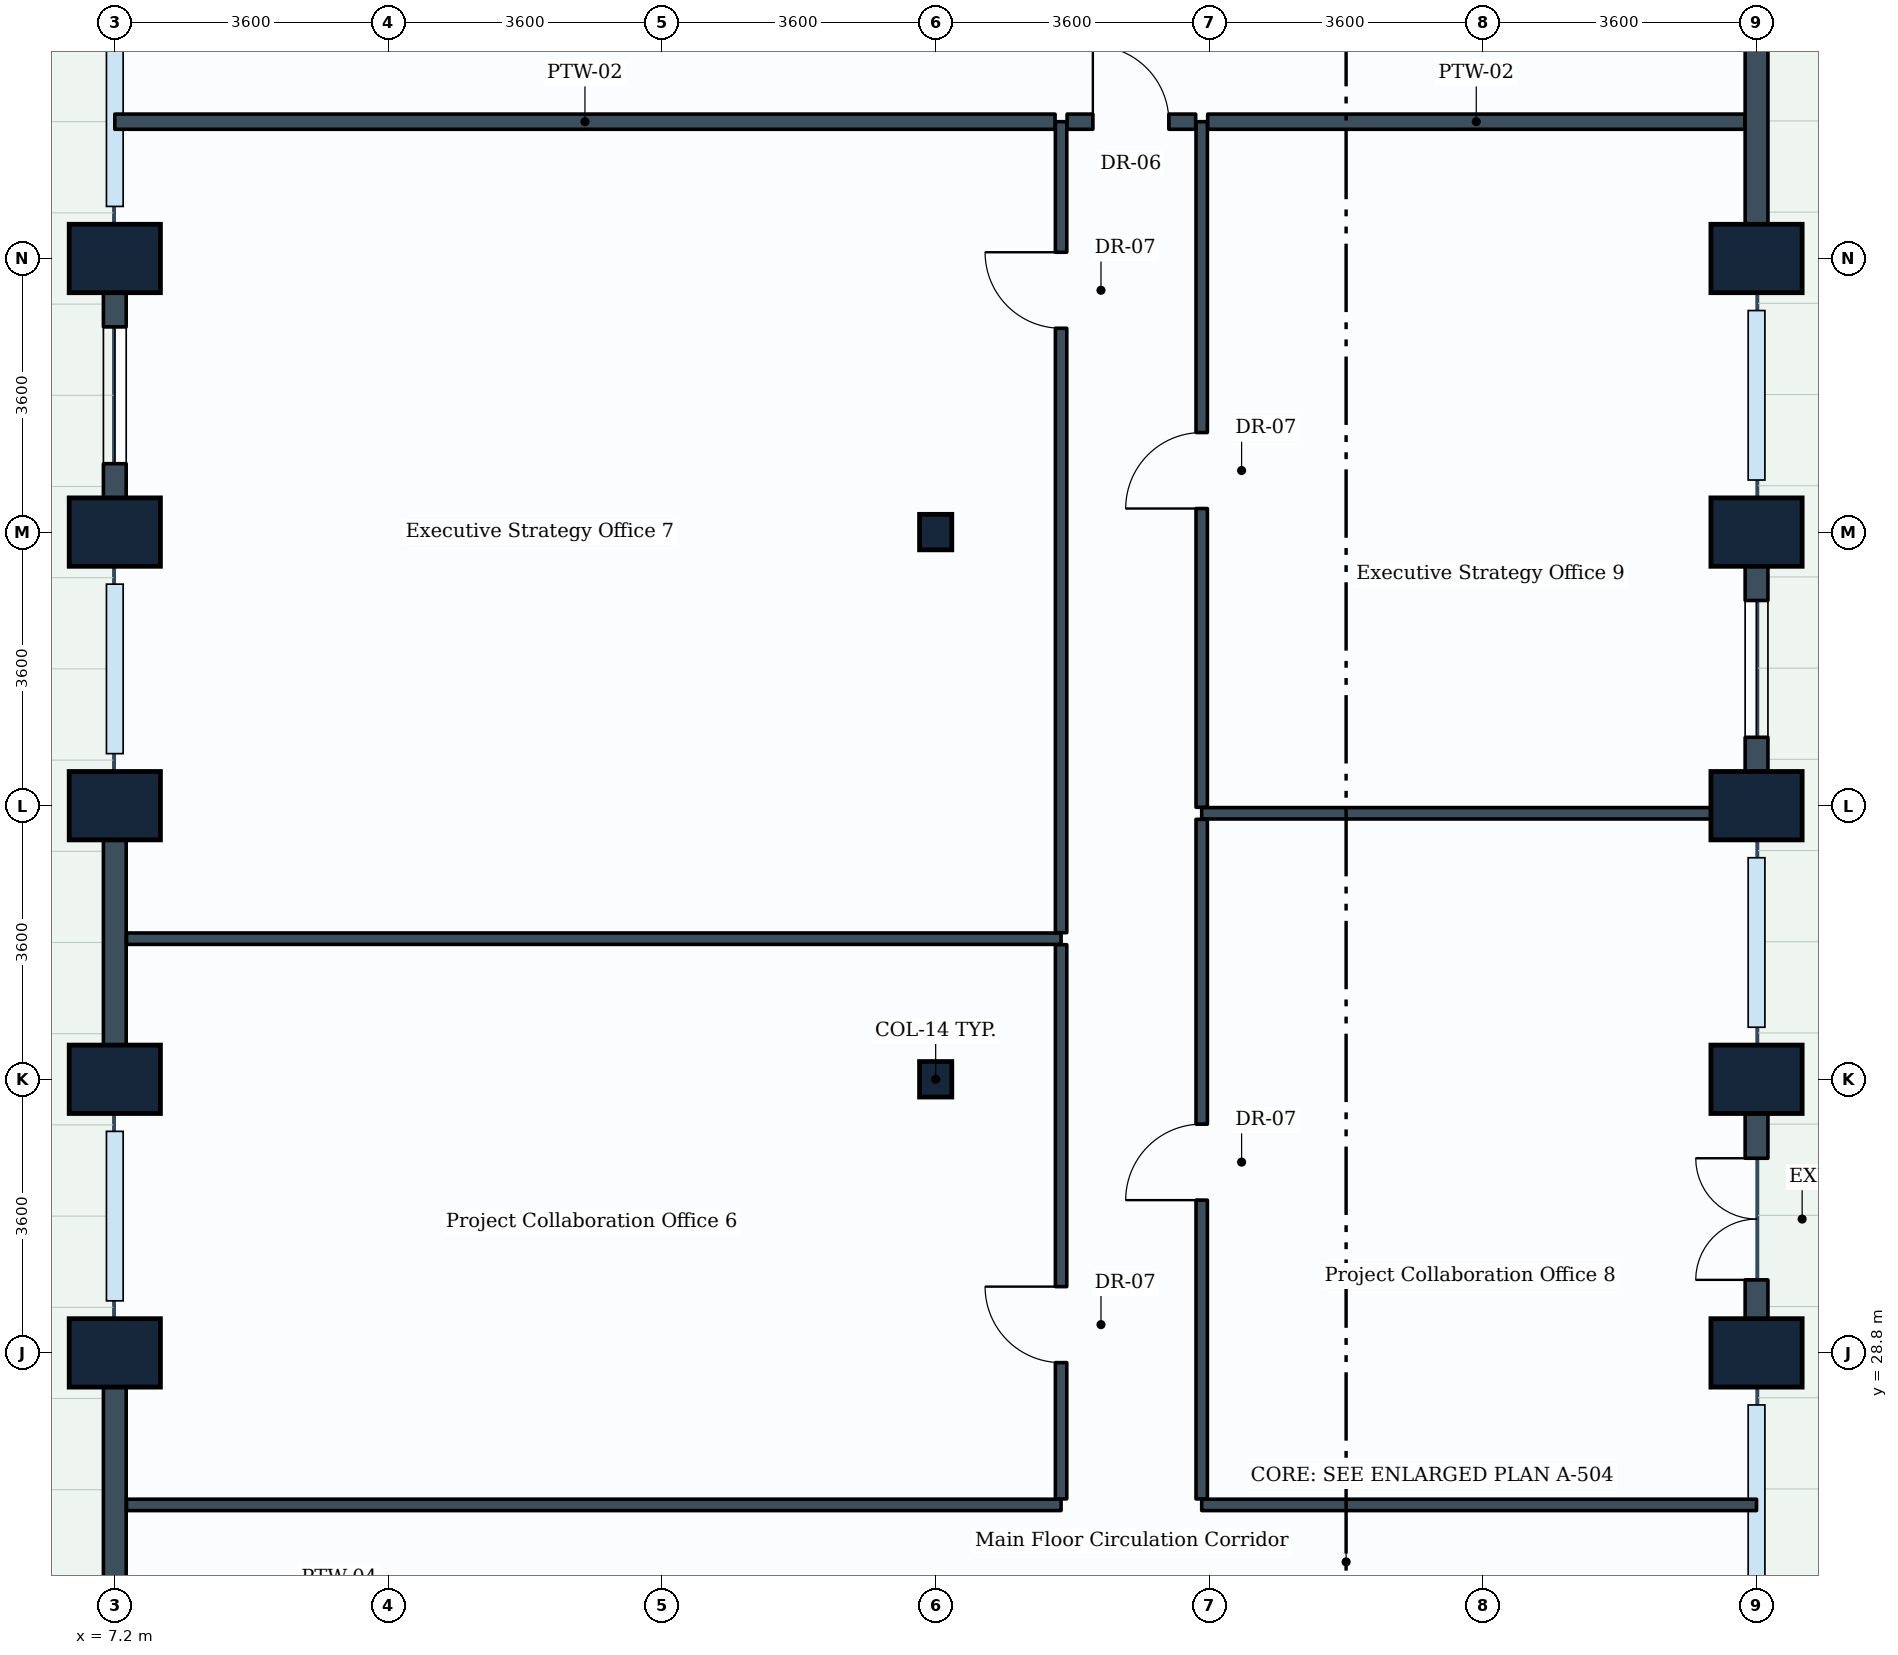
"""IFC4 building model, lengths in metres.
Left out: names, types, materials, properties, quantities, classifications, styles, units other than length and angle.
Written with IfcOpenShell. Run it as: python <this file> out.ifc"""

import sys

from ifc_helpers import new_model, si_unit, direction, frame, frame_2d, origin, origin_2d, place, context, subcontext, project, spatial, rectangle, i_section, extrude, element, fill, save


model = new_model("IFC4")
c1 = context("Model", 3, precision=1e-05, world=origin(), true_north=direction((0.0, 1.0)))
c2 = subcontext(c1, "Body", "Model", "MODEL_VIEW")
j1 = project(units=[si_unit("LENGTHUNIT", "METRE"), si_unit("PLANEANGLEUNIT", "RADIAN")], contexts=[c1])
p1 = place(None, origin())
s1 = spatial("IfcSite", under=j1, at=p1, CompositionType="ELEMENT")
p2 = place(p1, origin())
s2 = spatial("IfcBuilding", under=s1, at=p2, CompositionType="ELEMENT")
p3 = place(p2, frame((0.0, 0.0, 24.0)))
s3 = spatial("IfcBuildingStorey", under=s2, at=p3, CompositionType="ELEMENT", Elevation=24.0)
for number, where, z_axis, x_axis in (
    (1, (7.2, 28.8, 0.0), (0.0, 0.0, 1.0), (0.0, 1.0, 0.0)),
    (2, (7.2, 32.4, 0.0), (0.0, 0.0, 1.0), (0.0, 1.0, 0.0)),
    (3, (7.2, 36.0, 0.0), (0.0, 0.0, 1.0), (0.0, 1.0, 0.0)),
    (4, (7.2, 39.6, 0.0), (0.0, 0.0, 1.0), (0.0, 1.0, 0.0)),
    (5, (7.2, 43.2, 0.0), (0.0, 0.0, 1.0), (0.0, 1.0, 0.0)),
):
    element("IfcColumn", number, at=place(p3, frame(where, z_axis=z_axis, x_axis=x_axis)), inside=s3, PredefinedType="COLUMN", context=c2, shape_type="SweptSolid", body=[
        extrude(rectangle(XDim=0.9, YDim=1.2, at=origin_2d()), origin(), (0.0, 0.0, 1.0), 3.9),
    ])
for number, where, z_axis, x_axis in (
    (6, (18.0, 32.4, 0.0), (0.0, 0.0, 1.0), (1.0, 0.0, 0.0)),
    (7, (18.0, 39.6, 0.0), (0.0, 0.0, 1.0), (1.0, 0.0, 0.0)),
):
    element("IfcColumn", number, at=place(p3, frame(where, z_axis=z_axis, x_axis=x_axis)), inside=s3, PredefinedType="COLUMN", context=c2, shape_type="SweptSolid", body=[
        extrude(i_section(OverallWidth=0.424, OverallDepth=0.467, WebThickness=0.033, FlangeThickness=0.053, FilletRadius=0.015, at=origin_2d()), origin(), (0.0, 0.0, 1.0), 3.9),
    ])
for number, where, z_axis, x_axis in (
    (8, (28.8, 28.8, 0.0), (0.0, 0.0, 1.0), (0.0, 1.0, 0.0)),
    (9, (28.8, 32.4, 0.0), (0.0, 0.0, 1.0), (0.0, 1.0, 0.0)),
    (10, (28.8, 36.0, 0.0), (0.0, 0.0, 1.0), (0.0, 1.0, 0.0)),
    (11, (28.8, 39.6, 0.0), (0.0, 0.0, 1.0), (0.0, 1.0, 0.0)),
    (12, (28.8, 43.2, 0.0), (0.0, 0.0, 1.0), (0.0, 1.0, 0.0)),
):
    element("IfcColumn", number, at=place(p3, frame(where, z_axis=z_axis, x_axis=x_axis)), inside=s3, PredefinedType="COLUMN", context=c2, shape_type="SweptSolid", body=[
        extrude(rectangle(XDim=0.9, YDim=1.2, at=origin_2d()), origin(), (0.0, 0.0, 1.0), 3.9),
    ])
p4 = place(p3, frame((28.8, 28.8, 0.0), z_axis=(0.0, 0.0, 1.0), x_axis=(0.0, 1.0, 0.0)))
e13 = element("IfcWall", 13, at=p4, inside=s3, PredefinedType="STANDARD", context=c2, shape_type="SweptSolid", body=[
    extrude(rectangle(XDim=3.6, YDim=0.3, at=frame_2d((1.8, 0.0))), origin(), (0.0, 0.0, 1.0), 2.93),
])
p5 = place(p4, frame((0.961, 0.0, 0.0)))
e14 = element("IfcOpeningElement", 14, at=p5, cuts=e13, PredefinedType="OPENING", context=c2, shape_type="SweptSolid", body=[
    extrude(rectangle(XDim=1.6, YDim=2.1, at=frame_2d((0.8, 1.05))), frame((0.0, 0.16, 0.0), z_axis=(0.0, -1.0, 0.0), x_axis=(1.0, 0.0, 0.0)), (0.0, 0.0, 1.0), 0.32),
])
p6 = place(p3, frame((28.8, 36.0, 0.0), z_axis=(0.0, 0.0, 1.0), x_axis=(0.0, 1.0, 0.0)))
e15 = element("IfcWall", 15, at=p6, inside=s3, PredefinedType="STANDARD", context=c2, shape_type="SweptSolid", body=[
    extrude(rectangle(XDim=3.6, YDim=0.3, at=frame_2d((1.8, 0.0))), origin(), (0.0, 0.0, 1.0), 2.93),
])
p7 = place(p6, frame((0.9, 0.0, 0.85)))
e16 = element("IfcOpeningElement", 16, at=p7, cuts=e15, PredefinedType="OPENING", context=c2, shape_type="SweptSolid", body=[
    extrude(rectangle(XDim=1.8, YDim=1.35, at=frame_2d((0.9, 0.675))), frame((0.0, 0.16, 0.0), z_axis=(0.0, -1.0, 0.0), x_axis=(1.0, 0.0, 0.0)), (0.0, 0.0, 1.0), 0.32),
])
p8 = place(p3, frame((28.8, 43.2, 0.0), z_axis=(0.0, 0.0, 1.0), x_axis=(0.0, 1.0, 0.0)))
e17 = element("IfcWall", 17, at=p8, inside=s3, PredefinedType="STANDARD", context=c2, shape_type="SweptSolid", body=[
    extrude(rectangle(XDim=3.6, YDim=0.3, at=frame_2d((1.8, 0.0))), origin(), (0.0, 0.0, 1.0), 2.93),
])
p9 = place(p3, frame((7.2, 39.6, 0.0), z_axis=(0.0, 0.0, 1.0), x_axis=(0.0, 1.0, 0.0)))
e18 = element("IfcWall", 18, at=p9, inside=s3, PredefinedType="STANDARD", context=c2, shape_type="SweptSolid", body=[
    extrude(rectangle(XDim=3.6, YDim=0.3, at=frame_2d((1.8, 0.0))), origin(), (0.0, 0.0, 1.0), 2.93),
])
p10 = place(p9, frame((0.9, 0.0, 0.85)))
e19 = element("IfcOpeningElement", 19, at=p10, cuts=e18, PredefinedType="OPENING", context=c2, shape_type="SweptSolid", body=[
    extrude(rectangle(XDim=1.8, YDim=1.35, at=frame_2d((0.9, 0.675))), frame((0.0, 0.16, 0.0), z_axis=(0.0, -1.0, 0.0), x_axis=(1.0, 0.0, 0.0)), (0.0, 0.0, 1.0), 0.32),
])
for number, where, z_axis, x_axis in (
    (20, (7.2, 32.4, 0.0), (0.0, 0.0, 1.0), (0.0, 1.0, 0.0)),
    (21, (7.2, 25.2, 0.0), (0.0, 0.0, 1.0), (0.0, 1.0, 0.0)),
):
    element("IfcWall", number, at=place(p3, frame(where, z_axis=z_axis, x_axis=x_axis)), inside=s3, PredefinedType="STANDARD", context=c2, shape_type="SweptSolid", body=[
        extrude(rectangle(XDim=3.6, YDim=0.3, at=frame_2d((1.8, 0.0))), origin(), (0.0, 0.0, 1.0), 2.93),
    ])
for number, where, z_axis, x_axis in (
    (22, (7.354, 26.8, 0.0), (0.0, 0.0, 1.0), (1.0, 0.0, 0.0)),
    (23, (7.354, 34.25, 0.0), (0.0, 0.0, 1.0), (1.0, 0.0, 0.0)),
):
    element("IfcWall", number, at=place(p3, frame(where, z_axis=z_axis, x_axis=x_axis)), inside=s3, PredefinedType="PARTITIONING", context=c2, shape_type="SweptSolid", body=[
        extrude(rectangle(XDim=12.296, YDim=0.15, at=frame_2d((6.148, 0.0))), origin(), (0.0, 0.0, 1.0), 2.93),
    ])
p11 = place(p3, frame((19.65, 26.879, 0.0), z_axis=(0.0, 0.0, 1.0), x_axis=(0.0, 1.0, 0.0)))
e24 = element("IfcWall", 24, at=p11, inside=s3, PredefinedType="PARTITIONING", context=c2, shape_type="SweptSolid", body=[
    extrude(rectangle(XDim=7.292, YDim=0.15, at=frame_2d((3.646, 0.0))), origin(), (0.0, 0.0, 1.0), 3.08),
])
p12 = place(p11, frame((1.793, 0.0, 0.0)))
e25 = element("IfcOpeningElement", 25, at=p12, cuts=e24, PredefinedType="OPENING", context=c2, shape_type="SweptSolid", body=[
    extrude(rectangle(XDim=1.0, YDim=2.1, at=frame_2d((0.5, 1.05))), frame((0.0, 0.085, 0.0), z_axis=(0.0, -1.0, 0.0), x_axis=(1.0, 0.0, 0.0)), (0.0, 0.0, 1.0), 0.17),
])
p13 = place(p3, frame((19.65, 34.329, 0.0), z_axis=(0.0, 0.0, 1.0), x_axis=(0.0, 1.0, 0.0)))
e26 = element("IfcWall", 26, at=p13, inside=s3, PredefinedType="PARTITIONING", context=c2, shape_type="SweptSolid", body=[
    extrude(rectangle(XDim=10.671, YDim=0.15, at=frame_2d((5.335, 0.0))), origin(), (0.0, 0.0, 1.0), 3.08),
])
p14 = place(p13, frame((7.953, 0.0, 0.0)))
e27 = element("IfcOpeningElement", 27, at=p14, cuts=e26, PredefinedType="OPENING", context=c2, shape_type="SweptSolid", body=[
    extrude(rectangle(XDim=1.0, YDim=2.1, at=frame_2d((0.5, 1.05))), frame((0.0, 0.085, 0.0), z_axis=(0.0, -1.0, 0.0), x_axis=(1.0, 0.0, 0.0)), (0.0, 0.0, 1.0), 0.17),
])
p15 = place(p3, frame((21.5, 26.8, 0.0), z_axis=(0.0, 0.0, 1.0), x_axis=(1.0, 0.0, 0.0)))
e28 = element("IfcWall", 28, at=p15, inside=s3, PredefinedType="PARTITIONING", context=c2, shape_type="SweptSolid", body=[
    extrude(rectangle(XDim=7.3, YDim=0.15, at=frame_2d((3.65, 0.0))), origin(), (0.0, 0.0, 1.0), 3.635),
])
p16 = place(p3, frame((21.5, 35.9, 0.0), z_axis=(0.0, 0.0, 1.0), x_axis=(1.0, 0.0, 0.0)))
e29 = element("IfcWall", 29, at=p16, inside=s3, PredefinedType="PARTITIONING", context=c2, shape_type="SweptSolid", body=[
    extrude(rectangle(XDim=7.246, YDim=0.15, at=frame_2d((3.623, 0.0))), origin(), (0.0, 0.0, 1.0), 2.93),
])
p17 = place(p3, frame((21.5, 26.879, 0.0), z_axis=(0.0, 0.0, 1.0), x_axis=(0.0, 1.0, 0.0)))
e30 = element("IfcWall", 30, at=p17, inside=s3, PredefinedType="PARTITIONING", context=c2, shape_type="SweptSolid", body=[
    extrude(rectangle(XDim=8.942, YDim=0.15, at=frame_2d((4.471, 0.0))), origin(), (0.0, 0.0, 1.0), 3.08),
])
p18 = place(p17, frame((3.931, 0.0, 0.0)))
e31 = element("IfcOpeningElement", 31, at=p18, cuts=e30, PredefinedType="OPENING", context=c2, shape_type="SweptSolid", body=[
    extrude(rectangle(XDim=1.0, YDim=2.1, at=frame_2d((0.5, 1.05))), frame((0.0, 0.085, 0.0), z_axis=(0.0, -1.0, 0.0), x_axis=(1.0, 0.0, 0.0)), (0.0, 0.0, 1.0), 0.17),
])
p19 = place(p3, frame((21.5, 35.979, 0.0), z_axis=(0.0, 0.0, 1.0), x_axis=(0.0, 1.0, 0.0)))
e32 = element("IfcWall", 32, at=p19, inside=s3, PredefinedType="PARTITIONING", context=c2, shape_type="SweptSolid", body=[
    extrude(rectangle(XDim=9.021, YDim=0.15, at=frame_2d((4.51, 0.0))), origin(), (0.0, 0.0, 1.0), 3.03),
])
p20 = place(p19, frame((3.931, 0.0, 0.0)))
e33 = element("IfcOpeningElement", 33, at=p20, cuts=e32, PredefinedType="OPENING", context=c2, shape_type="SweptSolid", body=[
    extrude(rectangle(XDim=1.0, YDim=2.1, at=frame_2d((0.5, 1.05))), frame((0.0, 0.085, 0.0), z_axis=(0.0, -1.0, 0.0), x_axis=(1.0, 0.0, 0.0)), (0.0, 0.0, 1.0), 0.17),
])
p21 = place(p3, frame((7.2, 45.0, 0.0), z_axis=(0.0, 0.0, 1.0), x_axis=(1.0, 0.0, 0.0)))
e34 = element("IfcWall", 34, at=p21, inside=s3, PredefinedType="PARTITIONING", context=c2, shape_type="SweptSolid", body=[
    extrude(rectangle(XDim=12.371, YDim=0.2, at=frame_2d((6.186, 0.0))), origin(), (0.0, 0.0, 1.0), 2.93),
])
p22 = place(p3, frame((21.579, 45.0, 0.0), z_axis=(0.0, 0.0, 1.0), x_axis=(1.0, 0.0, 0.0)))
e35 = element("IfcWall", 35, at=p22, inside=s3, PredefinedType="PARTITIONING", context=c2, shape_type="SweptSolid", body=[
    extrude(rectangle(XDim=7.067, YDim=0.2, at=frame_2d((3.533, 0.0))), origin(), (0.0, 0.0, 1.0), 2.93),
])
p23 = place(p3, frame((19.729, 45.0, 0.0), z_axis=(0.0, 0.0, 1.0), x_axis=(1.0, 0.0, 0.0)))
e36 = element("IfcWall", 36, at=p23, inside=s3, PredefinedType="PARTITIONING", context=c2, shape_type="SweptSolid", body=[
    extrude(rectangle(XDim=1.692, YDim=0.2, at=frame_2d((0.846, 0.0))), origin(), (0.0, 0.0, 1.0), 3.635),
])
p24 = place(p23, frame((0.339, 0.0, 0.0)))
e37 = element("IfcOpeningElement", 37, at=p24, cuts=e36, PredefinedType="OPENING", context=c2, shape_type="SweptSolid", body=[
    extrude(rectangle(XDim=1.0, YDim=2.1, at=frame_2d((0.5, 1.05))), frame((0.0, 0.11, 0.0), z_axis=(0.0, -1.0, 0.0), x_axis=(1.0, 0.0, 0.0)), (0.0, 0.0, 1.0), 0.22),
])
p25 = place(p5, origin())
e38 = element("IfcDoor", 38, at=p25, inside=s3, OperationType="SINGLE_SWING_LEFT", PredefinedType="DOOR", context=c2, shape_type="SweptSolid", body=[
    extrude(rectangle(XDim=1.6, YDim=2.1, at=frame_2d((0.8, 1.05))), frame((0.0, 0.025, 0.0), z_axis=(0.0, -1.0, 0.0), x_axis=(1.0, 0.0, 0.0)), (0.0, 0.0, 1.0), 0.05),
])
fill(e14, e38)
p26 = place(p7, origin())
e39 = element("IfcWindow", 39, at=p26, inside=s3, PartitioningType="SINGLE_PANEL", PredefinedType="WINDOW", context=c2, shape_type="SweptSolid", body=[
    extrude(rectangle(XDim=1.8, YDim=1.35, at=frame_2d((0.9, 0.675))), frame((0.0, 0.03, 0.0), z_axis=(0.0, -1.0, 0.0), x_axis=(1.0, 0.0, 0.0)), (0.0, 0.0, 1.0), 0.06),
])
fill(e16, e39)
p27 = place(p10, origin())
e40 = element("IfcWindow", 40, at=p27, inside=s3, PartitioningType="SINGLE_PANEL", PredefinedType="WINDOW", context=c2, shape_type="SweptSolid", body=[
    extrude(rectangle(XDim=1.8, YDim=1.35, at=frame_2d((0.9, 0.675))), frame((0.0, 0.03, 0.0), z_axis=(0.0, -1.0, 0.0), x_axis=(1.0, 0.0, 0.0)), (0.0, 0.0, 1.0), 0.06),
])
fill(e19, e40)
p28 = place(p12, origin())
e41 = element("IfcDoor", 41, at=p28, inside=s3, OperationType="SINGLE_SWING_RIGHT", PredefinedType="DOOR", context=c2, shape_type="SweptSolid", body=[
    extrude(rectangle(XDim=1.0, YDim=2.1, at=frame_2d((0.5, 1.05))), frame((0.0, 0.025, 0.0), z_axis=(0.0, -1.0, 0.0), x_axis=(1.0, 0.0, 0.0)), (0.0, 0.0, 1.0), 0.05),
])
fill(e25, e41)
p29 = place(p14, origin())
e42 = element("IfcDoor", 42, at=p29, inside=s3, OperationType="SINGLE_SWING_RIGHT", PredefinedType="DOOR", context=c2, shape_type="SweptSolid", body=[
    extrude(rectangle(XDim=1.0, YDim=2.1, at=frame_2d((0.5, 1.05))), frame((0.0, 0.025, 0.0), z_axis=(0.0, -1.0, 0.0), x_axis=(1.0, 0.0, 0.0)), (0.0, 0.0, 1.0), 0.05),
])
fill(e27, e42)
p30 = place(p18, origin())
e43 = element("IfcDoor", 43, at=p30, inside=s3, OperationType="SINGLE_SWING_LEFT", PredefinedType="DOOR", context=c2, shape_type="SweptSolid", body=[
    extrude(rectangle(XDim=1.0, YDim=2.1, at=frame_2d((0.5, 1.05))), frame((0.0, 0.025, 0.0), z_axis=(0.0, -1.0, 0.0), x_axis=(1.0, 0.0, 0.0)), (0.0, 0.0, 1.0), 0.05),
])
fill(e31, e43)
p31 = place(p20, origin())
e44 = element("IfcDoor", 44, at=p31, inside=s3, OperationType="SINGLE_SWING_LEFT", PredefinedType="DOOR", context=c2, shape_type="SweptSolid", body=[
    extrude(rectangle(XDim=1.0, YDim=2.1, at=frame_2d((0.5, 1.05))), frame((0.0, 0.025, 0.0), z_axis=(0.0, -1.0, 0.0), x_axis=(1.0, 0.0, 0.0)), (0.0, 0.0, 1.0), 0.05),
])
fill(e33, e44)
p32 = place(p24, origin())
e45 = element("IfcDoor", 45, at=p32, inside=s3, OperationType="SINGLE_SWING_LEFT", PredefinedType="DOOR", context=c2, shape_type="SweptSolid", body=[
    extrude(rectangle(XDim=1.0, YDim=2.1, at=frame_2d((0.5, 1.05))), frame((0.0, 0.025, 0.0), z_axis=(0.0, -1.0, 0.0), x_axis=(1.0, 0.0, 0.0)), (0.0, 0.0, 1.0), 0.05),
])
fill(e37, e45)
save(model, sys.argv[1])
